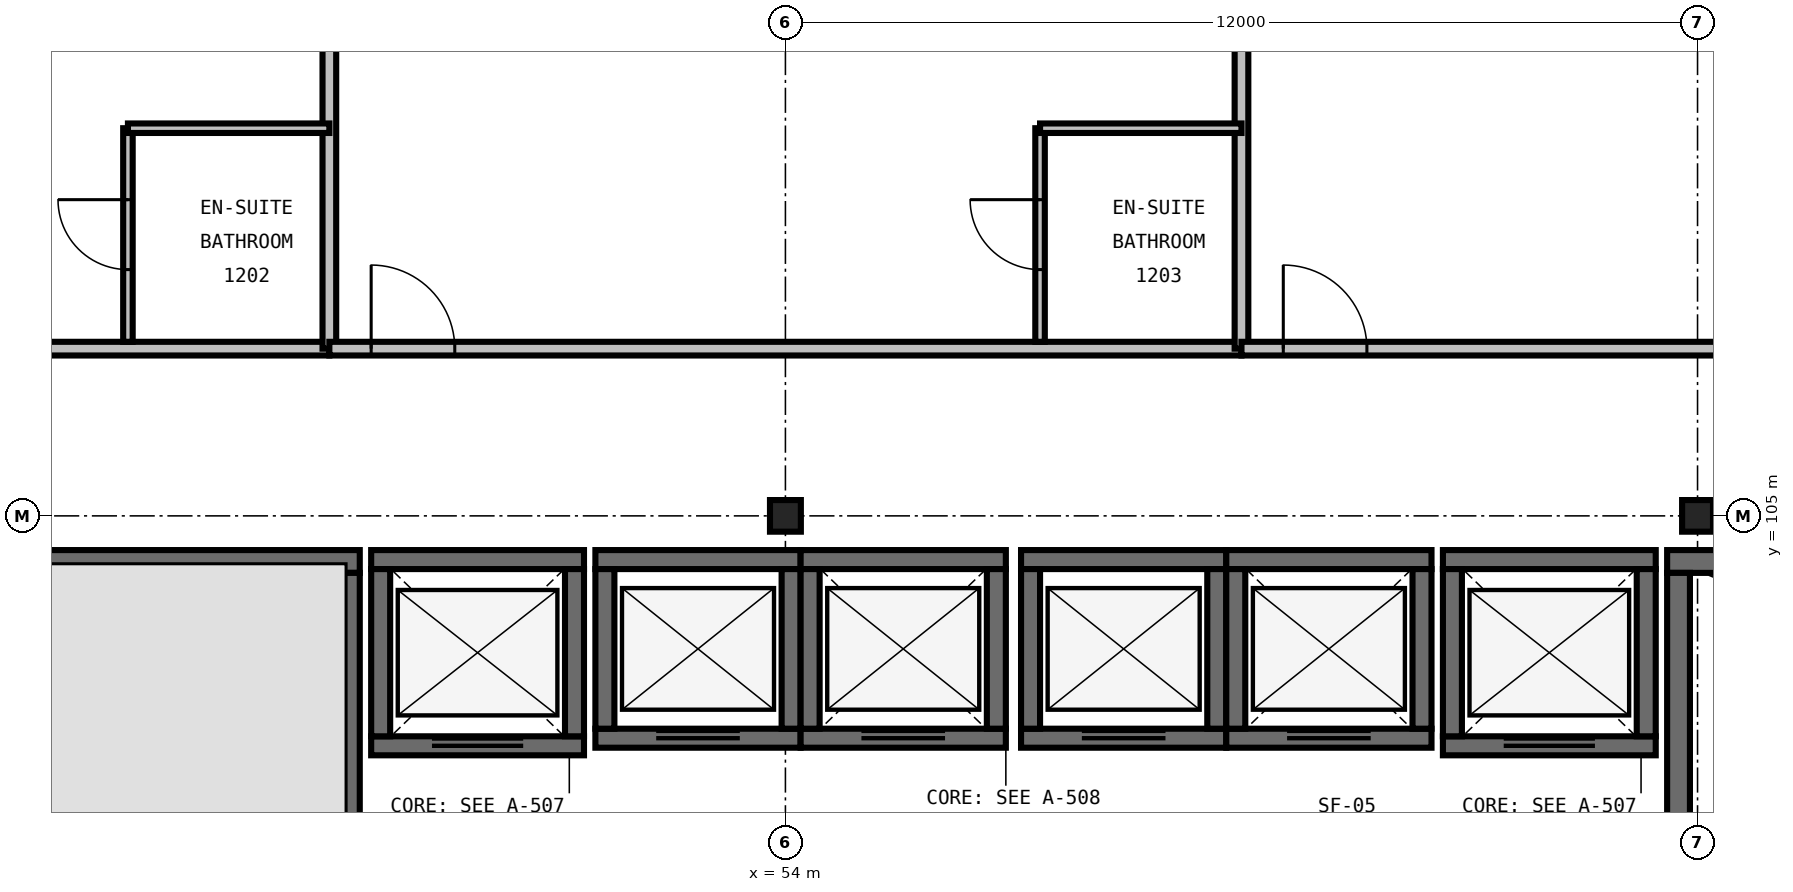
"""IFC4 building model, lengths in metres.
Left out: names, types, materials, properties, quantities, classifications, styles, units other than length and angle.
Written with IfcOpenShell. Run it as: python <this file> out.ifc"""

import sys

from ifc_helpers import new_model, si_unit, direction, frame, frame_2d, origin, origin_2d, place, context, subcontext, project, spatial, rectangle, i_section, extrude, element, fill, save


model = new_model("IFC4")
c1 = context("Model", 3, precision=1e-05, world=origin(), true_north=direction((0.0, 1.0)))
c2 = subcontext(c1, "Body", "Model", "MODEL_VIEW")
j1 = project(units=[si_unit("LENGTHUNIT", "METRE"), si_unit("PLANEANGLEUNIT", "RADIAN")], contexts=[c1])
p1 = place(None, origin())
s1 = spatial("IfcSite", under=j1, at=p1, CompositionType="ELEMENT")
p2 = place(p1, origin())
s2 = spatial("IfcBuilding", under=s1, at=p2, CompositionType="ELEMENT")
p3 = place(p2, frame((0.0, 0.0, 52.8)))
s3 = spatial("IfcBuildingStorey", under=s2, at=p3, CompositionType="ELEMENT", Elevation=52.8)
for number, where, z_axis, x_axis in (
    (1, (54.0, 105.0, 0.0), (0.0, 0.0, 1.0), (1.0, 0.0, 0.0)),
    (2, (66.0, 105.0, 0.0), (0.0, 0.0, 1.0), (1.0, 0.0, 0.0)),
):
    element("IfcColumn", number, at=place(p3, frame(where, z_axis=z_axis, x_axis=x_axis)), inside=s3, PredefinedType="COLUMN", context=c2, shape_type="SweptSolid", body=[
        extrude(i_section(OverallWidth=0.406, OverallDepth=0.416, WebThickness=0.03, FlangeThickness=0.048, FilletRadius=0.031, at=origin_2d()), origin(), (0.0, 0.0, 1.0), 3.6),
    ])
p4 = place(p3, frame((48.4, 104.4, 0.0), z_axis=(0.0, 0.0, 1.0), x_axis=(-1.0, 0.0, 0.0)))
e3 = element("IfcWall", 3, at=p4, inside=s3, PredefinedType="SHEAR", context=c2, shape_type="SweptSolid", body=[
    extrude(rectangle(XDim=9.8, YDim=0.3, at=frame_2d((4.9, 0.0))), origin(), (0.0, 0.0, 1.0), 3.6),
])
p5 = place(p3, frame((48.25, 100.61, 0.0), z_axis=(0.0, 0.0, 1.0), x_axis=(0.0, 1.0, 0.0)))
e4 = element("IfcWall", 4, at=p5, inside=s3, PredefinedType="SHEAR", context=c2, shape_type="SweptSolid", body=[
    extrude(rectangle(XDim=3.64, YDim=0.3, at=frame_2d((1.82, 0.0))), origin(), (0.0, 0.0, 1.0), 3.6),
])
p6 = place(p3, frame((75.4, 104.4, 0.0), z_axis=(0.0, 0.0, 1.0), x_axis=(-1.0, 0.0, 0.0)))
e5 = element("IfcWall", 5, at=p6, inside=s3, PredefinedType="SHEAR", context=c2, shape_type="SweptSolid", body=[
    extrude(rectangle(XDim=9.8, YDim=0.3, at=frame_2d((4.9, 0.0))), origin(), (0.0, 0.0, 1.0), 3.6),
])
p7 = place(p3, frame((65.75, 104.25, 0.0), z_axis=(0.0, 0.0, 1.0), x_axis=(0.0, -1.0, 0.0)))
e6 = element("IfcWall", 6, at=p7, inside=s3, PredefinedType="SHEAR", context=c2, shape_type="SweptSolid", body=[
    extrude(rectangle(XDim=3.64, YDim=0.3, at=frame_2d((1.82, 0.0))), origin(), (0.0, 0.0, 1.0), 3.6),
])
p8 = place(p3, frame((48.55, 101.975, 0.0), z_axis=(0.0, 0.0, 1.0), x_axis=(1.0, 0.0, 0.0)))
e7 = element("IfcWall", 7, at=p8, inside=s3, PredefinedType="SHEAR", context=c2, shape_type="SweptSolid", body=[
    extrude(rectangle(XDim=2.8, YDim=0.25, at=frame_2d((1.4, 0.0))), origin(), (0.0, 0.0, 1.0), 3.6),
])
p9 = place(p8, frame((0.8, 0.0, 0.0)))
e8 = element("IfcOpeningElement", 8, at=p9, cuts=e7, PredefinedType="OPENING", context=c2, shape_type="SweptSolid", body=[
    extrude(rectangle(XDim=1.2, YDim=2.2, at=frame_2d((0.6, 1.1))), frame((0.0, 0.14, 0.0), z_axis=(0.0, -1.0, 0.0), x_axis=(1.0, 0.0, 0.0)), (0.0, 0.0, 1.0), 0.28),
])
p10 = place(p3, frame((51.35, 104.425, 0.0), z_axis=(0.0, 0.0, 1.0), x_axis=(-1.0, 0.0, 0.0)))
e9 = element("IfcWall", 9, at=p10, inside=s3, PredefinedType="SHEAR", context=c2, shape_type="SweptSolid", body=[
    extrude(rectangle(XDim=2.8, YDim=0.25, at=frame_2d((1.4, 0.0))), origin(), (0.0, 0.0, 1.0), 3.6),
])
for number, where, z_axis, x_axis in (
    (10, (48.675, 104.3, 0.0), (0.0, 0.0, 1.0), (0.0, -1.0, 0.0)),
    (11, (51.225, 102.1, 0.0), (0.0, 0.0, 1.0), (0.0, 1.0, 0.0)),
):
    element("IfcWall", number, at=place(p3, frame(where, z_axis=z_axis, x_axis=x_axis)), inside=s3, PredefinedType="SHEAR", context=c2, shape_type="SweptSolid", body=[
        extrude(rectangle(XDim=2.2, YDim=0.25, at=frame_2d((1.1, 0.0))), origin(), (0.0, 0.0, 1.0), 3.6),
    ])
p11 = place(p3, frame((62.65, 101.975, 0.0), z_axis=(0.0, 0.0, 1.0), x_axis=(1.0, 0.0, 0.0)))
e12 = element("IfcWall", 12, at=p11, inside=s3, PredefinedType="SHEAR", context=c2, shape_type="SweptSolid", body=[
    extrude(rectangle(XDim=2.8, YDim=0.25, at=frame_2d((1.4, 0.0))), origin(), (0.0, 0.0, 1.0), 3.6),
])
p12 = place(p11, frame((0.8, 0.0, 0.0)))
e13 = element("IfcOpeningElement", 13, at=p12, cuts=e12, PredefinedType="OPENING", context=c2, shape_type="SweptSolid", body=[
    extrude(rectangle(XDim=1.2, YDim=2.2, at=frame_2d((0.6, 1.1))), frame((0.0, 0.14, 0.0), z_axis=(0.0, -1.0, 0.0), x_axis=(1.0, 0.0, 0.0)), (0.0, 0.0, 1.0), 0.28),
])
p13 = place(p3, frame((65.45, 104.425, 0.0), z_axis=(0.0, 0.0, 1.0), x_axis=(-1.0, 0.0, 0.0)))
e14 = element("IfcWall", 14, at=p13, inside=s3, PredefinedType="SHEAR", context=c2, shape_type="SweptSolid", body=[
    extrude(rectangle(XDim=2.8, YDim=0.25, at=frame_2d((1.4, 0.0))), origin(), (0.0, 0.0, 1.0), 3.6),
])
for number, where, z_axis, x_axis in (
    (15, (62.775, 104.3, 0.0), (0.0, 0.0, 1.0), (0.0, -1.0, 0.0)),
    (16, (65.325, 102.1, 0.0), (0.0, 0.0, 1.0), (0.0, 1.0, 0.0)),
):
    element("IfcWall", number, at=place(p3, frame(where, z_axis=z_axis, x_axis=x_axis)), inside=s3, PredefinedType="SHEAR", context=c2, shape_type="SweptSolid", body=[
        extrude(rectangle(XDim=2.2, YDim=0.25, at=frame_2d((1.1, 0.0))), origin(), (0.0, 0.0, 1.0), 3.6),
    ])
p14 = place(p3, frame((51.5, 102.075, 0.0), z_axis=(0.0, 0.0, 1.0), x_axis=(1.0, 0.0, 0.0)))
e17 = element("IfcWall", 17, at=p14, inside=s3, PredefinedType="SHEAR", context=c2, shape_type="SweptSolid", body=[
    extrude(rectangle(XDim=2.7, YDim=0.25, at=frame_2d((1.35, 0.0))), origin(), (0.0, 0.0, 1.0), 3.6),
])
p15 = place(p14, frame((0.8, 0.0, 0.0)))
e18 = element("IfcOpeningElement", 18, at=p15, cuts=e17, PredefinedType="OPENING", context=c2, shape_type="SweptSolid", body=[
    extrude(rectangle(XDim=1.1, YDim=2.2, at=frame_2d((0.55, 1.1))), frame((0.0, 0.14, 0.0), z_axis=(0.0, -1.0, 0.0), x_axis=(1.0, 0.0, 0.0)), (0.0, 0.0, 1.0), 0.28),
])
p16 = place(p3, frame((54.2, 104.425, 0.0), z_axis=(0.0, 0.0, 1.0), x_axis=(-1.0, 0.0, 0.0)))
e19 = element("IfcWall", 19, at=p16, inside=s3, PredefinedType="SHEAR", context=c2, shape_type="SweptSolid", body=[
    extrude(rectangle(XDim=2.7, YDim=0.25, at=frame_2d((1.35, 0.0))), origin(), (0.0, 0.0, 1.0), 3.6),
])
for number, where, z_axis, x_axis in (
    (20, (51.625, 104.3, 0.0), (0.0, 0.0, 1.0), (0.0, -1.0, 0.0)),
    (21, (54.075, 102.2, 0.0), (0.0, 0.0, 1.0), (0.0, 1.0, 0.0)),
):
    element("IfcWall", number, at=place(p3, frame(where, z_axis=z_axis, x_axis=x_axis)), inside=s3, PredefinedType="SHEAR", context=c2, shape_type="SweptSolid", body=[
        extrude(rectangle(XDim=2.1, YDim=0.25, at=frame_2d((1.05, 0.0))), origin(), (0.0, 0.0, 1.0), 3.6),
    ])
p17 = place(p3, frame((54.2, 102.075, 0.0), z_axis=(0.0, 0.0, 1.0), x_axis=(1.0, 0.0, 0.0)))
e22 = element("IfcWall", 22, at=p17, inside=s3, PredefinedType="SHEAR", context=c2, shape_type="SweptSolid", body=[
    extrude(rectangle(XDim=2.7, YDim=0.25, at=frame_2d((1.35, 0.0))), origin(), (0.0, 0.0, 1.0), 3.6),
])
p18 = place(p17, frame((0.8, 0.0, 0.0)))
e23 = element("IfcOpeningElement", 23, at=p18, cuts=e22, PredefinedType="OPENING", context=c2, shape_type="SweptSolid", body=[
    extrude(rectangle(XDim=1.1, YDim=2.2, at=frame_2d((0.55, 1.1))), frame((0.0, 0.14, 0.0), z_axis=(0.0, -1.0, 0.0), x_axis=(1.0, 0.0, 0.0)), (0.0, 0.0, 1.0), 0.28),
])
p19 = place(p3, frame((56.9, 104.425, 0.0), z_axis=(0.0, 0.0, 1.0), x_axis=(-1.0, 0.0, 0.0)))
e24 = element("IfcWall", 24, at=p19, inside=s3, PredefinedType="SHEAR", context=c2, shape_type="SweptSolid", body=[
    extrude(rectangle(XDim=2.7, YDim=0.25, at=frame_2d((1.35, 0.0))), origin(), (0.0, 0.0, 1.0), 3.6),
])
for number, where, z_axis, x_axis in (
    (25, (54.325, 104.3, 0.0), (0.0, 0.0, 1.0), (0.0, -1.0, 0.0)),
    (26, (56.775, 102.2, 0.0), (0.0, 0.0, 1.0), (0.0, 1.0, 0.0)),
):
    element("IfcWall", number, at=place(p3, frame(where, z_axis=z_axis, x_axis=x_axis)), inside=s3, PredefinedType="SHEAR", context=c2, shape_type="SweptSolid", body=[
        extrude(rectangle(XDim=2.1, YDim=0.25, at=frame_2d((1.05, 0.0))), origin(), (0.0, 0.0, 1.0), 3.6),
    ])
p20 = place(p3, frame((57.1, 102.075, 0.0), z_axis=(0.0, 0.0, 1.0), x_axis=(1.0, 0.0, 0.0)))
e27 = element("IfcWall", 27, at=p20, inside=s3, PredefinedType="SHEAR", context=c2, shape_type="SweptSolid", body=[
    extrude(rectangle(XDim=2.7, YDim=0.25, at=frame_2d((1.35, 0.0))), origin(), (0.0, 0.0, 1.0), 3.6),
])
p21 = place(p20, frame((0.8, 0.0, 0.0)))
e28 = element("IfcOpeningElement", 28, at=p21, cuts=e27, PredefinedType="OPENING", context=c2, shape_type="SweptSolid", body=[
    extrude(rectangle(XDim=1.1, YDim=2.2, at=frame_2d((0.55, 1.1))), frame((0.0, 0.14, 0.0), z_axis=(0.0, -1.0, 0.0), x_axis=(1.0, 0.0, 0.0)), (0.0, 0.0, 1.0), 0.28),
])
p22 = place(p3, frame((59.8, 104.425, 0.0), z_axis=(0.0, 0.0, 1.0), x_axis=(-1.0, 0.0, 0.0)))
e29 = element("IfcWall", 29, at=p22, inside=s3, PredefinedType="SHEAR", context=c2, shape_type="SweptSolid", body=[
    extrude(rectangle(XDim=2.7, YDim=0.25, at=frame_2d((1.35, 0.0))), origin(), (0.0, 0.0, 1.0), 3.6),
])
for number, where, z_axis, x_axis in (
    (30, (57.225, 104.3, 0.0), (0.0, 0.0, 1.0), (0.0, -1.0, 0.0)),
    (31, (59.675, 102.2, 0.0), (0.0, 0.0, 1.0), (0.0, 1.0, 0.0)),
):
    element("IfcWall", number, at=place(p3, frame(where, z_axis=z_axis, x_axis=x_axis)), inside=s3, PredefinedType="SHEAR", context=c2, shape_type="SweptSolid", body=[
        extrude(rectangle(XDim=2.1, YDim=0.25, at=frame_2d((1.05, 0.0))), origin(), (0.0, 0.0, 1.0), 3.6),
    ])
p23 = place(p3, frame((59.8, 102.075, 0.0), z_axis=(0.0, 0.0, 1.0), x_axis=(1.0, 0.0, 0.0)))
e32 = element("IfcWall", 32, at=p23, inside=s3, PredefinedType="SHEAR", context=c2, shape_type="SweptSolid", body=[
    extrude(rectangle(XDim=2.7, YDim=0.25, at=frame_2d((1.35, 0.0))), origin(), (0.0, 0.0, 1.0), 3.6),
])
p24 = place(p23, frame((0.8, 0.0, 0.0)))
e33 = element("IfcOpeningElement", 33, at=p24, cuts=e32, PredefinedType="OPENING", context=c2, shape_type="SweptSolid", body=[
    extrude(rectangle(XDim=1.1, YDim=2.2, at=frame_2d((0.55, 1.1))), frame((0.0, 0.14, 0.0), z_axis=(0.0, -1.0, 0.0), x_axis=(1.0, 0.0, 0.0)), (0.0, 0.0, 1.0), 0.28),
])
p25 = place(p3, frame((62.5, 104.425, 0.0), z_axis=(0.0, 0.0, 1.0), x_axis=(-1.0, 0.0, 0.0)))
e34 = element("IfcWall", 34, at=p25, inside=s3, PredefinedType="SHEAR", context=c2, shape_type="SweptSolid", body=[
    extrude(rectangle(XDim=2.7, YDim=0.25, at=frame_2d((1.35, 0.0))), origin(), (0.0, 0.0, 1.0), 3.6),
])
for number, where, z_axis, x_axis in (
    (35, (59.925, 104.3, 0.0), (0.0, 0.0, 1.0), (0.0, -1.0, 0.0)),
    (36, (62.375, 102.2, 0.0), (0.0, 0.0, 1.0), (0.0, 1.0, 0.0)),
):
    element("IfcWall", number, at=place(p3, frame(where, z_axis=z_axis, x_axis=x_axis)), inside=s3, PredefinedType="SHEAR", context=c2, shape_type="SweptSolid", body=[
        extrude(rectangle(XDim=2.1, YDim=0.25, at=frame_2d((1.05, 0.0))), origin(), (0.0, 0.0, 1.0), 3.6),
    ])
p26 = place(p3, frame((36.0, 107.2, 0.0), z_axis=(0.0, 0.0, 1.0), x_axis=(1.0, 0.0, 0.0)))
e37 = element("IfcWall", 37, at=p26, inside=s3, PredefinedType="PARTITIONING", context=c2, shape_type="SweptSolid", body=[
    extrude(rectangle(XDim=12.0, YDim=0.18, at=frame_2d((6.0, 0.0))), origin(), (0.0, 0.0, 1.0), 3.29),
])
p27 = place(p26, frame((0.55, 0.0, 0.0)))
e38 = element("IfcOpeningElement", 38, at=p27, cuts=e37, PredefinedType="OPENING", context=c2, shape_type="SweptSolid", body=[
    extrude(rectangle(XDim=1.1, YDim=2.2, at=frame_2d((0.55, 1.1))), frame((0.0, 0.105, 0.0), z_axis=(0.0, -1.0, 0.0), x_axis=(1.0, 0.0, 0.0)), (0.0, 0.0, 1.0), 0.21),
])
p28 = place(p3, frame((48.0, 107.2, 0.0), z_axis=(0.0, 0.0, 1.0), x_axis=(0.0, 1.0, 0.0)))
e39 = element("IfcWall", 39, at=p28, inside=s3, PredefinedType="PARTITIONING", context=c2, shape_type="SweptSolid", body=[
    extrude(rectangle(XDim=9.64, YDim=0.18, at=frame_2d((4.82, 0.0))), origin(), (0.0, 0.0, 1.0), 3.29),
])
p29 = place(p3, frame((45.35, 107.29, 0.0), z_axis=(0.0, 0.0, 1.0), x_axis=(0.0, 1.0, 0.0)))
e40 = element("IfcWall", 40, at=p29, inside=s3, PredefinedType="PARTITIONING", context=c2, shape_type="SweptSolid", body=[
    extrude(rectangle(XDim=2.81, YDim=0.125, at=frame_2d((1.405, 0.0))), origin(), (0.0, 0.0, 1.0), 3.29),
])
p30 = place(p29, frame((0.95, 0.0, 0.0)))
e41 = element("IfcOpeningElement", 41, at=p30, cuts=e40, PredefinedType="OPENING", context=c2, shape_type="SweptSolid", body=[
    extrude(rectangle(XDim=0.92, YDim=2.1, at=frame_2d((0.46, 1.05))), frame((0.0, 0.077, 0.0), z_axis=(0.0, -1.0, 0.0), x_axis=(1.0, 0.0, 0.0)), (0.0, 0.0, 1.0), 0.155),
])
p31 = place(p3, frame((45.35, 110.1, 0.0), z_axis=(0.0, 0.0, 1.0), x_axis=(1.0, 0.0, 0.0)))
e42 = element("IfcWall", 42, at=p31, inside=s3, PredefinedType="PARTITIONING", context=c2, shape_type="SweptSolid", body=[
    extrude(rectangle(XDim=2.65, YDim=0.125, at=frame_2d((1.325, 0.0))), origin(), (0.0, 0.0, 1.0), 3.29),
])
p32 = place(p3, frame((48.0, 107.2, 0.0), z_axis=(0.0, 0.0, 1.0), x_axis=(1.0, 0.0, 0.0)))
e43 = element("IfcWall", 43, at=p32, inside=s3, PredefinedType="PARTITIONING", context=c2, shape_type="SweptSolid", body=[
    extrude(rectangle(XDim=12.0, YDim=0.18, at=frame_2d((6.0, 0.0))), origin(), (0.0, 0.0, 1.0), 3.29),
])
p33 = place(p32, frame((0.55, 0.0, 0.0)))
e44 = element("IfcOpeningElement", 44, at=p33, cuts=e43, PredefinedType="OPENING", context=c2, shape_type="SweptSolid", body=[
    extrude(rectangle(XDim=1.1, YDim=2.2, at=frame_2d((0.55, 1.1))), frame((0.0, 0.105, 0.0), z_axis=(0.0, -1.0, 0.0), x_axis=(1.0, 0.0, 0.0)), (0.0, 0.0, 1.0), 0.21),
])
p34 = place(p3, frame((60.0, 107.2, 0.0), z_axis=(0.0, 0.0, 1.0), x_axis=(0.0, 1.0, 0.0)))
e45 = element("IfcWall", 45, at=p34, inside=s3, PredefinedType="PARTITIONING", context=c2, shape_type="SweptSolid", body=[
    extrude(rectangle(XDim=9.64, YDim=0.18, at=frame_2d((4.82, 0.0))), origin(), (0.0, 0.0, 1.0), 3.29),
])
p35 = place(p3, frame((57.35, 107.29, 0.0), z_axis=(0.0, 0.0, 1.0), x_axis=(0.0, 1.0, 0.0)))
e46 = element("IfcWall", 46, at=p35, inside=s3, PredefinedType="PARTITIONING", context=c2, shape_type="SweptSolid", body=[
    extrude(rectangle(XDim=2.81, YDim=0.125, at=frame_2d((1.405, 0.0))), origin(), (0.0, 0.0, 1.0), 3.29),
])
p36 = place(p35, frame((0.95, 0.0, 0.0)))
e47 = element("IfcOpeningElement", 47, at=p36, cuts=e46, PredefinedType="OPENING", context=c2, shape_type="SweptSolid", body=[
    extrude(rectangle(XDim=0.92, YDim=2.1, at=frame_2d((0.46, 1.05))), frame((0.0, 0.077, 0.0), z_axis=(0.0, -1.0, 0.0), x_axis=(1.0, 0.0, 0.0)), (0.0, 0.0, 1.0), 0.155),
])
p37 = place(p3, frame((57.35, 110.1, 0.0), z_axis=(0.0, 0.0, 1.0), x_axis=(1.0, 0.0, 0.0)))
e48 = element("IfcWall", 48, at=p37, inside=s3, PredefinedType="PARTITIONING", context=c2, shape_type="SweptSolid", body=[
    extrude(rectangle(XDim=2.65, YDim=0.125, at=frame_2d((1.325, 0.0))), origin(), (0.0, 0.0, 1.0), 3.29),
])
p38 = place(p3, frame((60.0, 107.2, 0.0), z_axis=(0.0, 0.0, 1.0), x_axis=(1.0, 0.0, 0.0)))
e49 = element("IfcWall", 49, at=p38, inside=s3, PredefinedType="PARTITIONING", context=c2, shape_type="SweptSolid", body=[
    extrude(rectangle(XDim=12.0, YDim=0.18, at=frame_2d((6.0, 0.0))), origin(), (0.0, 0.0, 1.0), 3.29),
])
p39 = place(p38, frame((0.55, 0.0, 0.0)))
e50 = element("IfcOpeningElement", 50, at=p39, cuts=e49, PredefinedType="OPENING", context=c2, shape_type="SweptSolid", body=[
    extrude(rectangle(XDim=1.1, YDim=2.2, at=frame_2d((0.55, 1.1))), frame((0.0, 0.105, 0.0), z_axis=(0.0, -1.0, 0.0), x_axis=(1.0, 0.0, 0.0)), (0.0, 0.0, 1.0), 0.21),
])
p40 = place(p9, origin())
e51 = element("IfcDoor", 51, at=p40, inside=s3, OperationType="DOUBLE_DOOR_SLIDING", PredefinedType="DOOR", context=c2, shape_type="SweptSolid", body=[
    extrude(rectangle(XDim=1.2, YDim=2.2, at=frame_2d((0.6, 1.1))), frame((0.0, 0.025, 0.0), z_axis=(0.0, -1.0, 0.0), x_axis=(1.0, 0.0, 0.0)), (0.0, 0.0, 1.0), 0.05),
])
fill(e8, e51)
p41 = place(p12, origin())
e52 = element("IfcDoor", 52, at=p41, inside=s3, OperationType="DOUBLE_DOOR_SLIDING", PredefinedType="DOOR", context=c2, shape_type="SweptSolid", body=[
    extrude(rectangle(XDim=1.2, YDim=2.2, at=frame_2d((0.6, 1.1))), frame((0.0, 0.025, 0.0), z_axis=(0.0, -1.0, 0.0), x_axis=(1.0, 0.0, 0.0)), (0.0, 0.0, 1.0), 0.05),
])
fill(e13, e52)
p42 = place(p15, origin())
e53 = element("IfcDoor", 53, at=p42, inside=s3, OperationType="DOUBLE_DOOR_SLIDING", PredefinedType="DOOR", context=c2, shape_type="SweptSolid", body=[
    extrude(rectangle(XDim=1.1, YDim=2.2, at=frame_2d((0.55, 1.1))), frame((0.0, 0.025, 0.0), z_axis=(0.0, -1.0, 0.0), x_axis=(1.0, 0.0, 0.0)), (0.0, 0.0, 1.0), 0.05),
])
fill(e18, e53)
p43 = place(p18, origin())
e54 = element("IfcDoor", 54, at=p43, inside=s3, OperationType="DOUBLE_DOOR_SLIDING", PredefinedType="DOOR", context=c2, shape_type="SweptSolid", body=[
    extrude(rectangle(XDim=1.1, YDim=2.2, at=frame_2d((0.55, 1.1))), frame((0.0, 0.025, 0.0), z_axis=(0.0, -1.0, 0.0), x_axis=(1.0, 0.0, 0.0)), (0.0, 0.0, 1.0), 0.05),
])
fill(e23, e54)
p44 = place(p21, origin())
e55 = element("IfcDoor", 55, at=p44, inside=s3, OperationType="DOUBLE_DOOR_SLIDING", PredefinedType="DOOR", context=c2, shape_type="SweptSolid", body=[
    extrude(rectangle(XDim=1.1, YDim=2.2, at=frame_2d((0.55, 1.1))), frame((0.0, 0.025, 0.0), z_axis=(0.0, -1.0, 0.0), x_axis=(1.0, 0.0, 0.0)), (0.0, 0.0, 1.0), 0.05),
])
fill(e28, e55)
p45 = place(p24, origin())
e56 = element("IfcDoor", 56, at=p45, inside=s3, OperationType="DOUBLE_DOOR_SLIDING", PredefinedType="DOOR", context=c2, shape_type="SweptSolid", body=[
    extrude(rectangle(XDim=1.1, YDim=2.2, at=frame_2d((0.55, 1.1))), frame((0.0, 0.025, 0.0), z_axis=(0.0, -1.0, 0.0), x_axis=(1.0, 0.0, 0.0)), (0.0, 0.0, 1.0), 0.05),
])
fill(e33, e56)
p46 = place(p30, origin())
e57 = element("IfcDoor", 57, at=p46, inside=s3, OperationType="SINGLE_SWING_RIGHT", PredefinedType="DOOR", context=c2, shape_type="SweptSolid", body=[
    extrude(rectangle(XDim=0.92, YDim=2.1, at=frame_2d((0.46, 1.05))), frame((0.0, 0.025, 0.0), z_axis=(0.0, -1.0, 0.0), x_axis=(1.0, 0.0, 0.0)), (0.0, 0.0, 1.0), 0.05),
])
fill(e41, e57)
p47 = place(p33, origin())
e58 = element("IfcDoor", 58, at=p47, inside=s3, OperationType="SINGLE_SWING_LEFT", PredefinedType="DOOR", context=c2, shape_type="SweptSolid", body=[
    extrude(rectangle(XDim=1.1, YDim=2.2, at=frame_2d((0.55, 1.1))), frame((0.0, 0.025, 0.0), z_axis=(0.0, -1.0, 0.0), x_axis=(1.0, 0.0, 0.0)), (0.0, 0.0, 1.0), 0.05),
])
fill(e44, e58)
p48 = place(p36, origin())
e59 = element("IfcDoor", 59, at=p48, inside=s3, OperationType="SINGLE_SWING_RIGHT", PredefinedType="DOOR", context=c2, shape_type="SweptSolid", body=[
    extrude(rectangle(XDim=0.92, YDim=2.1, at=frame_2d((0.46, 1.05))), frame((0.0, 0.025, 0.0), z_axis=(0.0, -1.0, 0.0), x_axis=(1.0, 0.0, 0.0)), (0.0, 0.0, 1.0), 0.05),
])
fill(e47, e59)
p49 = place(p39, origin())
e60 = element("IfcDoor", 60, at=p49, inside=s3, OperationType="SINGLE_SWING_LEFT", PredefinedType="DOOR", context=c2, shape_type="SweptSolid", body=[
    extrude(rectangle(XDim=1.1, YDim=2.2, at=frame_2d((0.55, 1.1))), frame((0.0, 0.025, 0.0), z_axis=(0.0, -1.0, 0.0), x_axis=(1.0, 0.0, 0.0)), (0.0, 0.0, 1.0), 0.05),
])
fill(e50, e60)
save(model, sys.argv[1])
